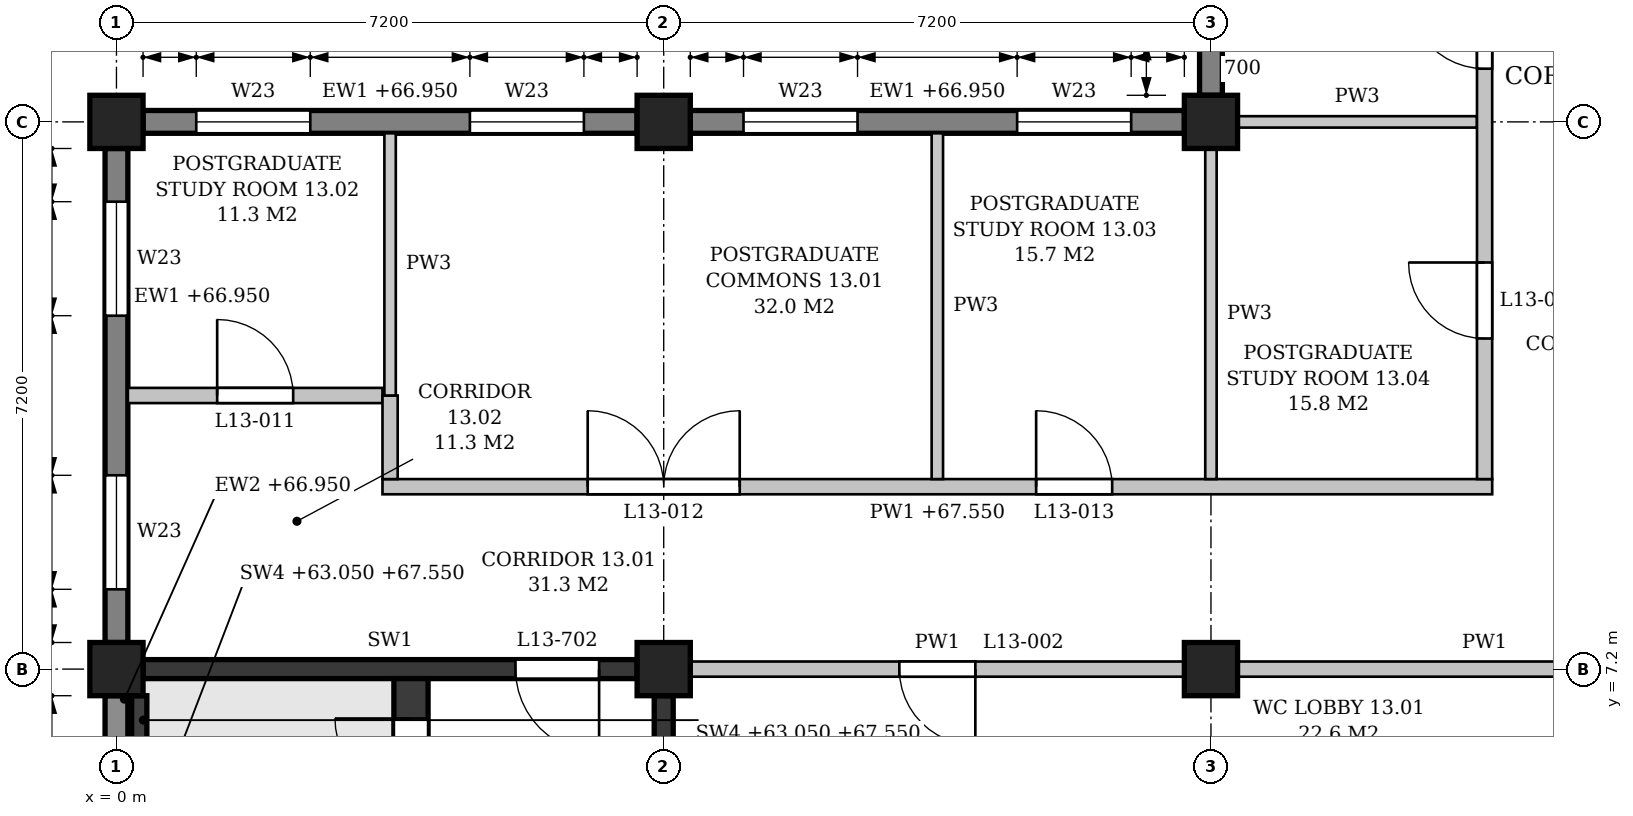
"""IFC4 building model, lengths in metres.
Left out: names, types, materials, properties, quantities, classifications, styles, units other than length and angle.
Written with IfcOpenShell. Run it as: python <this file> out.ifc"""

import sys

from ifc_helpers import new_model, si_unit, direction, frame, frame_2d, origin, origin_2d, place, context, subcontext, project, spatial, polyline, rectangle, outline, extrude, element, fill, save


model = new_model("IFC4")
c1 = context("Model", 3, precision=1e-05, world=origin(), true_north=direction((0.0, 1.0)))
c2 = subcontext(c1, "Body", "Model", "MODEL_VIEW")
j1 = project(units=[si_unit("LENGTHUNIT", "METRE"), si_unit("PLANEANGLEUNIT", "RADIAN")], contexts=[c1])
p1 = place(None, origin())
s1 = spatial("IfcSite", under=j1, at=p1, CompositionType="ELEMENT")
p2 = place(p1, origin())
s2 = spatial("IfcBuilding", under=s1, at=p2, CompositionType="ELEMENT")
p3 = place(p2, frame((0.0, 0.0, 63.3)))
s3 = spatial("IfcBuildingStorey", under=s2, at=p3, CompositionType="ELEMENT", Elevation=63.3)
for number, where, z_axis, x_axis in (
    (1, (0.0, 7.2, 0.0), (0.0, 0.0, 1.0), (1.0, 0.0, 0.0)),
    (2, (0.0, 14.4, 0.0), (0.0, 0.0, 1.0), (1.0, 0.0, 0.0)),
    (3, (7.2, 7.2, 0.0), (0.0, 0.0, 1.0), (1.0, 0.0, 0.0)),
    (4, (7.2, 14.4, 0.0), (0.0, 0.0, 1.0), (1.0, 0.0, 0.0)),
    (5, (14.4, 7.2, 0.0), (0.0, 0.0, 1.0), (1.0, 0.0, 0.0)),
    (6, (14.4, 14.4, 0.0), (0.0, 0.0, 1.0), (1.0, 0.0, 0.0)),
):
    element("IfcColumn", number, at=place(p3, frame(where, z_axis=z_axis, x_axis=x_axis)), inside=s3, PredefinedType="COLUMN", context=c2, shape_type="SweptSolid", body=[
        extrude(rectangle(XDim=0.7, YDim=0.7, at=origin_2d()), origin(), (0.0, 0.0, 1.0), 4.5),
    ])
p4 = place(p3, frame((0.0, 0.35, 0.0), z_axis=(0.0, 0.0, 1.0), x_axis=(0.0, 1.0, 0.0)))
e7 = element("IfcWall", 7, at=p4, inside=s3, PredefinedType="STANDARD", context=c2, shape_type="SweptSolid", body=[
    extrude(rectangle(XDim=6.5, YDim=0.3, at=frame_2d((3.25, 0.0))), origin(), (0.0, 0.0, 1.0), 3.65),
])
p5 = place(p4, frame((1.0, 0.0, 0.9)))
e8 = element("IfcOpeningElement", 8, at=p5, cuts=e7, PredefinedType="OPENING", context=c2, shape_type="SweptSolid", body=[
    extrude(outline(polyline([(0.0, 0.0), (0.9, 0.0), (0.9, 2.25), (0.45, 2.7), (0.0, 2.25), (0.0, 0.0)])), frame((0.0, 0.16, 0.0), z_axis=(0.0, -1.0, 0.0), x_axis=(1.0, 0.0, 0.0)), (0.0, 0.0, 1.0), 0.32),
])
p6 = place(p4, frame((4.6, 0.0, 0.9)))
e9 = element("IfcOpeningElement", 9, at=p6, cuts=e7, PredefinedType="OPENING", context=c2, shape_type="SweptSolid", body=[
    extrude(outline(polyline([(0.0, 0.0), (0.9, 0.0), (0.9, 2.25), (0.45, 2.7), (0.0, 2.25), (0.0, 0.0)])), frame((0.0, 0.16, 0.0), z_axis=(0.0, -1.0, 0.0), x_axis=(1.0, 0.0, 0.0)), (0.0, 0.0, 1.0), 0.32),
])
p7 = place(p3, frame((0.0, 7.55, 0.0), z_axis=(0.0, 0.0, 1.0), x_axis=(0.0, 1.0, 0.0)))
e10 = element("IfcWall", 10, at=p7, inside=s3, PredefinedType="STANDARD", context=c2, shape_type="SweptSolid", body=[
    extrude(rectangle(XDim=6.5, YDim=0.3, at=frame_2d((3.25, 0.0))), origin(), (0.0, 0.0, 1.0), 3.65),
])
p8 = place(p7, frame((0.7, 0.0, 0.9)))
e11 = element("IfcOpeningElement", 11, at=p8, cuts=e10, PredefinedType="OPENING", context=c2, shape_type="SweptSolid", body=[
    extrude(outline(polyline([(0.0, 0.0), (1.5, 0.0), (1.5, 1.95), (0.75, 2.7), (0.0, 1.95), (0.0, 0.0)])), frame((0.0, 0.16, 0.0), z_axis=(0.0, -1.0, 0.0), x_axis=(1.0, 0.0, 0.0)), (0.0, 0.0, 1.0), 0.32),
])
p9 = place(p7, frame((4.3, 0.0, 0.9)))
e12 = element("IfcOpeningElement", 12, at=p9, cuts=e10, PredefinedType="OPENING", context=c2, shape_type="SweptSolid", body=[
    extrude(outline(polyline([(0.0, 0.0), (1.5, 0.0), (1.5, 1.95), (0.75, 2.7), (0.0, 1.95), (0.0, 0.0)])), frame((0.0, 0.16, 0.0), z_axis=(0.0, -1.0, 0.0), x_axis=(1.0, 0.0, 0.0)), (0.0, 0.0, 1.0), 0.32),
])
p10 = place(p3, frame((14.05, 14.4, 0.0), z_axis=(0.0, 0.0, 1.0), x_axis=(-1.0, 0.0, 0.0)))
e13 = element("IfcWall", 13, at=p10, inside=s3, PredefinedType="STANDARD", context=c2, shape_type="SweptSolid", body=[
    extrude(rectangle(XDim=6.5, YDim=0.3, at=frame_2d((3.25, 0.0))), origin(), (0.0, 0.0, 1.0), 3.65),
])
p11 = place(p10, frame((0.7, 0.0, 0.9)))
e14 = element("IfcOpeningElement", 14, at=p11, cuts=e13, PredefinedType="OPENING", context=c2, shape_type="SweptSolid", body=[
    extrude(outline(polyline([(0.0, 0.0), (1.5, 0.0), (1.5, 1.95), (0.75, 2.7), (0.0, 1.95), (0.0, 0.0)])), frame((0.0, 0.16, 0.0), z_axis=(0.0, -1.0, 0.0), x_axis=(1.0, 0.0, 0.0)), (0.0, 0.0, 1.0), 0.32),
])
p12 = place(p10, frame((4.3, 0.0, 0.9)))
e15 = element("IfcOpeningElement", 15, at=p12, cuts=e13, PredefinedType="OPENING", context=c2, shape_type="SweptSolid", body=[
    extrude(outline(polyline([(0.0, 0.0), (1.5, 0.0), (1.5, 1.95), (0.75, 2.7), (0.0, 1.95), (0.0, 0.0)])), frame((0.0, 0.16, 0.0), z_axis=(0.0, -1.0, 0.0), x_axis=(1.0, 0.0, 0.0)), (0.0, 0.0, 1.0), 0.32),
])
p13 = place(p3, frame((6.85, 14.4, 0.0), z_axis=(0.0, 0.0, 1.0), x_axis=(-1.0, 0.0, 0.0)))
e16 = element("IfcWall", 16, at=p13, inside=s3, PredefinedType="STANDARD", context=c2, shape_type="SweptSolid", body=[
    extrude(rectangle(XDim=6.5, YDim=0.3, at=frame_2d((3.25, 0.0))), origin(), (0.0, 0.0, 1.0), 3.65),
])
p14 = place(p13, frame((0.7, 0.0, 0.9)))
e17 = element("IfcOpeningElement", 17, at=p14, cuts=e16, PredefinedType="OPENING", context=c2, shape_type="SweptSolid", body=[
    extrude(outline(polyline([(0.0, 0.0), (1.5, 0.0), (1.5, 1.95), (0.75, 2.7), (0.0, 1.95), (0.0, 0.0)])), frame((0.0, 0.16, 0.0), z_axis=(0.0, -1.0, 0.0), x_axis=(1.0, 0.0, 0.0)), (0.0, 0.0, 1.0), 0.32),
])
p15 = place(p13, frame((4.3, 0.0, 0.9)))
e18 = element("IfcOpeningElement", 18, at=p15, cuts=e16, PredefinedType="OPENING", context=c2, shape_type="SweptSolid", body=[
    extrude(outline(polyline([(0.0, 0.0), (1.5, 0.0), (1.5, 1.95), (0.75, 2.7), (0.0, 1.95), (0.0, 0.0)])), frame((0.0, 0.16, 0.0), z_axis=(0.0, -1.0, 0.0), x_axis=(1.0, 0.0, 0.0)), (0.0, 0.0, 1.0), 0.32),
])
p16 = place(p3, frame((14.4, 14.75, 0.0), z_axis=(0.0, 0.0, 1.0), x_axis=(0.0, 1.0, 0.0)))
e19 = element("IfcWall", 19, at=p16, inside=s3, PredefinedType="STANDARD", context=c2, shape_type="SweptSolid", body=[
    extrude(rectangle(XDim=6.5, YDim=0.3, at=frame_2d((3.25, 0.0))), origin(), (0.0, 0.0, 1.0), 3.65),
])
p17 = place(p16, frame((0.7, 0.0, 0.9)))
e20 = element("IfcOpeningElement", 20, at=p17, cuts=e19, PredefinedType="OPENING", context=c2, shape_type="SweptSolid", body=[
    extrude(outline(polyline([(0.0, 0.0), (1.5, 0.0), (1.5, 1.95), (0.75, 2.7), (0.0, 1.95), (0.0, 0.0)])), frame((0.0, 0.16, 0.0), z_axis=(0.0, -1.0, 0.0), x_axis=(1.0, 0.0, 0.0)), (0.0, 0.0, 1.0), 0.32),
])
p18 = place(p16, frame((4.3, 0.0, 0.9)))
e21 = element("IfcOpeningElement", 21, at=p18, cuts=e19, PredefinedType="OPENING", context=c2, shape_type="SweptSolid", body=[
    extrude(outline(polyline([(0.0, 0.0), (1.5, 0.0), (1.5, 1.95), (0.75, 2.7), (0.0, 1.95), (0.0, 0.0)])), frame((0.0, 0.16, 0.0), z_axis=(0.0, -1.0, 0.0), x_axis=(1.0, 0.0, 0.0)), (0.0, 0.0, 1.0), 0.32),
])
p19 = place(p3, frame((0.35, 7.2, 0.0), z_axis=(0.0, 0.0, 1.0), x_axis=(1.0, 0.0, 0.0)))
e22 = element("IfcWall", 22, at=p19, inside=s3, PredefinedType="SHEAR", context=c2, shape_type="SweptSolid", body=[
    extrude(rectangle(XDim=6.5, YDim=0.25, at=frame_2d((3.25, 0.0))), origin(), (0.0, 0.0, 1.0), 3.6),
])
p20 = place(p19, frame((4.9, 0.0, 0.0)))
e23 = element("IfcOpeningElement", 23, at=p20, cuts=e22, PredefinedType="OPENING", context=c2, shape_type="SweptSolid", body=[
    extrude(rectangle(XDim=1.1, YDim=2.1, at=frame_2d((0.55, 1.05))), frame((0.0, 0.135, 0.0), z_axis=(0.0, -1.0, 0.0), x_axis=(1.0, 0.0, 0.0)), (0.0, 0.0, 1.0), 0.27),
])
p21 = place(p3, frame((7.2, 0.35, 0.0), z_axis=(0.0, 0.0, 1.0), x_axis=(0.0, 1.0, 0.0)))
e24 = element("IfcWall", 24, at=p21, inside=s3, PredefinedType="SHEAR", context=c2, shape_type="SweptSolid", body=[
    extrude(rectangle(XDim=6.5, YDim=0.25, at=frame_2d((3.25, 0.0))), origin(), (0.0, 0.0, 1.0), 3.6),
])
p22 = place(p3, frame((0.3, 5.85, -0.25), z_axis=(0.0, 0.0, 1.0), x_axis=(0.0, 1.0, 0.0)))
e25 = element("IfcWall", 25, at=p22, inside=s3, PredefinedType="SHEAR", context=c2, shape_type="SweptSolid", body=[
    extrude(rectangle(XDim=1.0, YDim=0.2, at=frame_2d((0.5, 0.0))), origin(), (0.0, 0.0, 1.0), 4.5),
])
p23 = place(p3, frame((3.875, 0.15, 0.0), z_axis=(0.0, 0.0, 1.0), x_axis=(0.0, 1.0, 0.0)))
e26 = element("IfcWall", 26, at=p23, inside=s3, PredefinedType="SHEAR", context=c2, shape_type="SweptSolid", body=[
    extrude(rectangle(XDim=6.925, YDim=0.45, at=frame_2d((3.462, 0.0))), origin(), (0.0, 0.0, 1.0), 4.25),
])
p24 = place(p23, frame((5.4, 0.0, 0.0)))
e27 = element("IfcOpeningElement", 27, at=p24, cuts=e26, PredefinedType="OPENING", context=c2, shape_type="SweptSolid", body=[
    extrude(rectangle(XDim=1.0, YDim=2.1, at=frame_2d((0.5, 1.05))), frame((0.0, 0.235, 0.0), z_axis=(0.0, -1.0, 0.0), x_axis=(1.0, 0.0, 0.0)), (0.0, 0.0, 1.0), 0.47),
])
p25 = place(p3, frame((7.55, 7.2, 0.0), z_axis=(0.0, 0.0, 1.0), x_axis=(1.0, 0.0, 0.0)))
e28 = element("IfcWall", 28, at=p25, inside=s3, PredefinedType="PARTITIONING", context=c2, shape_type="SweptSolid", body=[
    extrude(rectangle(XDim=6.5, YDim=0.2, at=frame_2d((3.25, 0.0))), origin(), (0.0, 0.0, 1.0), 3.6),
])
p26 = place(p25, frame((2.75, 0.0, 0.0)))
e29 = element("IfcOpeningElement", 29, at=p26, cuts=e28, PredefinedType="OPENING", context=c2, shape_type="SweptSolid", body=[
    extrude(rectangle(XDim=1.0, YDim=2.1, at=frame_2d((0.5, 1.05))), frame((0.0, 0.11, 0.0), z_axis=(0.0, -1.0, 0.0), x_axis=(1.0, 0.0, 0.0)), (0.0, 0.0, 1.0), 0.22),
])
p27 = place(p3, frame((14.75, 7.2, 0.0), z_axis=(0.0, 0.0, 1.0), x_axis=(1.0, 0.0, 0.0)))
e30 = element("IfcWall", 30, at=p27, inside=s3, PredefinedType="PARTITIONING", context=c2, shape_type="SweptSolid", body=[
    extrude(rectangle(XDim=6.5, YDim=0.2, at=frame_2d((3.25, 0.0))), origin(), (0.0, 0.0, 1.0), 3.6),
])
p28 = place(p27, frame((4.375, 0.0, 0.0)))
e31 = element("IfcOpeningElement", 31, at=p28, cuts=e30, PredefinedType="OPENING", context=c2, shape_type="SweptSolid", body=[
    extrude(rectangle(XDim=1.0, YDim=2.1, at=frame_2d((0.5, 1.05))), frame((0.0, 0.11, 0.0), z_axis=(0.0, -1.0, 0.0), x_axis=(1.0, 0.0, 0.0)), (0.0, 0.0, 1.0), 0.22),
])
p29 = place(p3, frame((3.5, 9.6, 0.0), z_axis=(0.0, 0.0, 1.0), x_axis=(1.0, 0.0, 0.0)))
e32 = element("IfcWall", 32, at=p29, inside=s3, PredefinedType="PARTITIONING", context=c2, shape_type="SweptSolid", body=[
    extrude(outline(polyline([(0.0, 0.0), (14.6, 0.0), (14.6, 4.25), (11.1, 4.25), (11.1, 3.6), (10.7, 3.6), (10.7, 4.25), (3.9, 4.25), (3.9, 3.6), (3.5, 3.6), (3.5, 4.25), (0.0, 4.25), (0.0, 0.0)])), frame((0.0, 0.1, 0.0), z_axis=(0.0, -1.0, 0.0), x_axis=(1.0, 0.0, 0.0)), (0.0, 0.0, 1.0), 0.2),
])
p30 = place(p29, frame((2.7, 0.0, 0.0)))
e33 = element("IfcOpeningElement", 33, at=p30, cuts=e32, PredefinedType="OPENING", context=c2, shape_type="SweptSolid", body=[
    extrude(rectangle(XDim=2.0, YDim=2.1, at=frame_2d((1.0, 1.05))), frame((0.0, 0.11, 0.0), z_axis=(0.0, -1.0, 0.0), x_axis=(1.0, 0.0, 0.0)), (0.0, 0.0, 1.0), 0.22),
])
p31 = place(p29, frame((8.6, 0.0, 0.0)))
e34 = element("IfcOpeningElement", 34, at=p31, cuts=e32, PredefinedType="OPENING", context=c2, shape_type="SweptSolid", body=[
    extrude(rectangle(XDim=1.0, YDim=2.1, at=frame_2d((0.5, 1.05))), frame((0.0, 0.11, 0.0), z_axis=(0.0, -1.0, 0.0), x_axis=(1.0, 0.0, 0.0)), (0.0, 0.0, 1.0), 0.22),
])
p32 = place(p3, frame((0.15, 10.8, 0.0), z_axis=(0.0, 0.0, 1.0), x_axis=(1.0, 0.0, 0.0)))
e35 = element("IfcWall", 35, at=p32, inside=s3, PredefinedType="PARTITIONING", context=c2, shape_type="SweptSolid", body=[
    extrude(outline(polyline([(0.0, 0.0), (3.35, 0.0), (3.35, 4.25), (0.05, 4.25), (0.05, 3.65), (0.0, 3.65), (0.0, 0.0)])), frame((0.0, 0.1, 0.0), z_axis=(0.0, -1.0, 0.0), x_axis=(1.0, 0.0, 0.0)), (0.0, 0.0, 1.0), 0.2),
])
p33 = place(p32, frame((1.175, 0.0, 0.0)))
e36 = element("IfcOpeningElement", 36, at=p33, cuts=e35, PredefinedType="OPENING", context=c2, shape_type="SweptSolid", body=[
    extrude(rectangle(XDim=1.0, YDim=2.1, at=frame_2d((0.5, 1.05))), frame((0.0, 0.11, 0.0), z_axis=(0.0, -1.0, 0.0), x_axis=(1.0, 0.0, 0.0)), (0.0, 0.0, 1.0), 0.22),
])
p34 = place(p3, frame((14.75, 14.4, 0.0), z_axis=(0.0, 0.0, 1.0), x_axis=(1.0, 0.0, 0.0)))
e37 = element("IfcWall", 37, at=p34, inside=s3, PredefinedType="PARTITIONING", context=c2, shape_type="SweptSolid", body=[
    extrude(rectangle(XDim=3.15, YDim=0.15, at=frame_2d((1.575, 0.0))), origin(), (0.0, 0.0, 1.0), 3.6),
])
p35 = place(p3, frame((3.6, 9.7, 0.0), z_axis=(0.0, 0.0, 1.0), x_axis=(0.0, 1.0, 0.0)))
e38 = element("IfcWall", 38, at=p35, inside=s3, PredefinedType="PARTITIONING", context=c2, shape_type="SweptSolid", body=[
    extrude(rectangle(XDim=1.1, YDim=0.2, at=frame_2d((0.55, 0.0))), origin(), (0.0, 0.0, 1.0), 4.25),
])
p36 = place(p3, frame((3.6, 10.8, 0.0), z_axis=(0.0, 0.0, 1.0), x_axis=(0.0, 1.0, 0.0)))
e39 = element("IfcWall", 39, at=p36, inside=s3, PredefinedType="PARTITIONING", context=c2, shape_type="SweptSolid", body=[
    extrude(rectangle(XDim=3.45, YDim=0.15, at=frame_2d((1.725, 0.0))), origin(), (0.0, 0.0, 1.0), 3.6),
])
p37 = place(p3, frame((10.8, 9.7, 0.0), z_axis=(0.0, 0.0, 1.0), x_axis=(0.0, 1.0, 0.0)))
e40 = element("IfcWall", 40, at=p37, inside=s3, PredefinedType="PARTITIONING", context=c2, shape_type="SweptSolid", body=[
    extrude(rectangle(XDim=4.55, YDim=0.15, at=frame_2d((2.275, 0.0))), origin(), (0.0, 0.0, 1.0), 3.6),
])
p38 = place(p3, frame((14.4, 9.7, 0.0), z_axis=(0.0, 0.0, 1.0), x_axis=(0.0, 1.0, 0.0)))
e41 = element("IfcWall", 41, at=p38, inside=s3, PredefinedType="PARTITIONING", context=c2, shape_type="SweptSolid", body=[
    extrude(rectangle(XDim=4.35, YDim=0.15, at=frame_2d((2.175, 0.0))), origin(), (0.0, 0.0, 1.0), 3.6),
])
p39 = place(p3, frame((18.0, 9.7, 0.0), z_axis=(0.0, 0.0, 1.0), x_axis=(0.0, 1.0, 0.0)))
e42 = element("IfcWall", 42, at=p39, inside=s3, PredefinedType="PARTITIONING", context=c2, shape_type="SweptSolid", body=[
    extrude(outline(polyline([(0.0, 0.0), (7.1, 0.0), (7.1, 4.25), (4.9, 4.25), (4.9, 3.65), (4.5, 3.65), (4.5, 4.25), (0.0, 4.25), (0.0, 0.0)])), frame((0.0, 0.1, 0.0), z_axis=(0.0, -1.0, 0.0), x_axis=(1.0, 0.0, 0.0)), (0.0, 0.0, 1.0), 0.2),
])
p40 = place(p39, frame((5.4, 0.0, 0.0)))
e43 = element("IfcOpeningElement", 43, at=p40, cuts=e42, PredefinedType="OPENING", context=c2, shape_type="SweptSolid", body=[
    extrude(rectangle(XDim=1.0, YDim=2.1, at=frame_2d((0.5, 1.05))), frame((0.0, 0.11, 0.0), z_axis=(0.0, -1.0, 0.0), x_axis=(1.0, 0.0, 0.0)), (0.0, 0.0, 1.0), 0.22),
])
p41 = place(p39, frame((1.85, 0.0, 0.0)))
e44 = element("IfcOpeningElement", 44, at=p41, cuts=e42, PredefinedType="OPENING", context=c2, shape_type="SweptSolid", body=[
    extrude(rectangle(XDim=1.0, YDim=2.1, at=frame_2d((0.5, 1.05))), frame((0.0, 0.11, 0.0), z_axis=(0.0, -1.0, 0.0), x_axis=(1.0, 0.0, 0.0)), (0.0, 0.0, 1.0), 0.22),
])
p42 = place(p11, origin())
e45 = element("IfcWindow", 45, at=p42, inside=s3, PartitioningType="SINGLE_PANEL", PredefinedType="WINDOW", context=c2, shape_type="SweptSolid", body=[
    extrude(outline(polyline([(0.0, 0.0), (1.5, 0.0), (1.5, 1.95), (0.75, 2.7), (0.0, 1.95), (0.0, 0.0)])), frame((0.0, 0.03, 0.0), z_axis=(0.0, -1.0, 0.0), x_axis=(1.0, 0.0, 0.0)), (0.0, 0.0, 1.0), 0.06),
])
fill(e14, e45)
p43 = place(p12, origin())
e46 = element("IfcWindow", 46, at=p43, inside=s3, PartitioningType="SINGLE_PANEL", PredefinedType="WINDOW", context=c2, shape_type="SweptSolid", body=[
    extrude(outline(polyline([(0.0, 0.0), (1.5, 0.0), (1.5, 1.95), (0.75, 2.7), (0.0, 1.95), (0.0, 0.0)])), frame((0.0, 0.03, 0.0), z_axis=(0.0, -1.0, 0.0), x_axis=(1.0, 0.0, 0.0)), (0.0, 0.0, 1.0), 0.06),
])
fill(e15, e46)
p44 = place(p14, origin())
e47 = element("IfcWindow", 47, at=p44, inside=s3, PartitioningType="SINGLE_PANEL", PredefinedType="WINDOW", context=c2, shape_type="SweptSolid", body=[
    extrude(outline(polyline([(0.0, 0.0), (1.5, 0.0), (1.5, 1.95), (0.75, 2.7), (0.0, 1.95), (0.0, 0.0)])), frame((0.0, 0.03, 0.0), z_axis=(0.0, -1.0, 0.0), x_axis=(1.0, 0.0, 0.0)), (0.0, 0.0, 1.0), 0.06),
])
fill(e17, e47)
p45 = place(p15, origin())
e48 = element("IfcWindow", 48, at=p45, inside=s3, PartitioningType="SINGLE_PANEL", PredefinedType="WINDOW", context=c2, shape_type="SweptSolid", body=[
    extrude(outline(polyline([(0.0, 0.0), (1.5, 0.0), (1.5, 1.95), (0.75, 2.7), (0.0, 1.95), (0.0, 0.0)])), frame((0.0, 0.03, 0.0), z_axis=(0.0, -1.0, 0.0), x_axis=(1.0, 0.0, 0.0)), (0.0, 0.0, 1.0), 0.06),
])
fill(e18, e48)
p46 = place(p8, origin())
e49 = element("IfcWindow", 49, at=p46, inside=s3, PartitioningType="SINGLE_PANEL", PredefinedType="WINDOW", context=c2, shape_type="SweptSolid", body=[
    extrude(outline(polyline([(0.0, 0.0), (1.5, 0.0), (1.5, 1.95), (0.75, 2.7), (0.0, 1.95), (0.0, 0.0)])), frame((0.0, 0.03, 0.0), z_axis=(0.0, -1.0, 0.0), x_axis=(1.0, 0.0, 0.0)), (0.0, 0.0, 1.0), 0.06),
])
fill(e11, e49)
p47 = place(p9, origin())
e50 = element("IfcWindow", 50, at=p47, inside=s3, PartitioningType="SINGLE_PANEL", PredefinedType="WINDOW", context=c2, shape_type="SweptSolid", body=[
    extrude(outline(polyline([(0.0, 0.0), (1.5, 0.0), (1.5, 1.95), (0.75, 2.7), (0.0, 1.95), (0.0, 0.0)])), frame((0.0, 0.03, 0.0), z_axis=(0.0, -1.0, 0.0), x_axis=(1.0, 0.0, 0.0)), (0.0, 0.0, 1.0), 0.06),
])
fill(e12, e50)
p48 = place(p24, origin())
e51 = element("IfcDoor", 51, at=p48, inside=s3, OperationType="SINGLE_SWING_RIGHT", PredefinedType="DOOR", context=c2, shape_type="SweptSolid", body=[
    extrude(rectangle(XDim=1.0, YDim=2.1, at=frame_2d((0.5, 1.05))), frame((0.0, 0.025, 0.0), z_axis=(0.0, -1.0, 0.0), x_axis=(1.0, 0.0, 0.0)), (0.0, 0.0, 1.0), 0.05),
])
fill(e27, e51)
p49 = place(p20, frame((1.1, 0.0, 0.0), z_axis=(0.0, 0.0, 1.0), x_axis=(-1.0, 0.0, 0.0)))
e52 = element("IfcDoor", 52, at=p49, inside=s3, OperationType="SINGLE_SWING_LEFT", PredefinedType="DOOR", context=c2, shape_type="SweptSolid", body=[
    extrude(rectangle(XDim=1.1, YDim=2.1, at=frame_2d((0.55, 1.05))), frame((0.0, 0.025, 0.0), z_axis=(0.0, -1.0, 0.0), x_axis=(1.0, 0.0, 0.0)), (0.0, 0.0, 1.0), 0.05),
])
fill(e23, e52)
p50 = place(p26, frame((1.0, 0.0, 0.0), z_axis=(0.0, 0.0, 1.0), x_axis=(-1.0, 0.0, 0.0)))
e53 = element("IfcDoor", 53, at=p50, inside=s3, OperationType="SINGLE_SWING_LEFT", PredefinedType="DOOR", context=c2, shape_type="SweptSolid", body=[
    extrude(rectangle(XDim=1.0, YDim=2.1, at=frame_2d((0.5, 1.05))), frame((0.0, 0.025, 0.0), z_axis=(0.0, -1.0, 0.0), x_axis=(1.0, 0.0, 0.0)), (0.0, 0.0, 1.0), 0.05),
])
fill(e29, e53)
p51 = place(p40, origin())
e54 = element("IfcDoor", 54, at=p51, inside=s3, OperationType="SINGLE_SWING_RIGHT", PredefinedType="DOOR", context=c2, shape_type="SweptSolid", body=[
    extrude(rectangle(XDim=1.0, YDim=2.1, at=frame_2d((0.5, 1.05))), frame((0.0, 0.025, 0.0), z_axis=(0.0, -1.0, 0.0), x_axis=(1.0, 0.0, 0.0)), (0.0, 0.0, 1.0), 0.05),
])
fill(e43, e54)
p52 = place(p33, origin())
e55 = element("IfcDoor", 55, at=p52, inside=s3, OperationType="SINGLE_SWING_LEFT", PredefinedType="DOOR", context=c2, shape_type="SweptSolid", body=[
    extrude(rectangle(XDim=1.0, YDim=2.1, at=frame_2d((0.5, 1.05))), frame((0.0, 0.025, 0.0), z_axis=(0.0, -1.0, 0.0), x_axis=(1.0, 0.0, 0.0)), (0.0, 0.0, 1.0), 0.05),
])
fill(e36, e55)
p53 = place(p30, origin())
e56 = element("IfcDoor", 56, at=p53, inside=s3, OperationType="DOUBLE_DOOR_SINGLE_SWING", PredefinedType="DOOR", context=c2, shape_type="SweptSolid", body=[
    extrude(rectangle(XDim=2.0, YDim=2.1, at=frame_2d((1.0, 1.05))), frame((0.0, 0.025, 0.0), z_axis=(0.0, -1.0, 0.0), x_axis=(1.0, 0.0, 0.0)), (0.0, 0.0, 1.0), 0.05),
])
fill(e33, e56)
p54 = place(p31, origin())
e57 = element("IfcDoor", 57, at=p54, inside=s3, OperationType="SINGLE_SWING_LEFT", PredefinedType="DOOR", context=c2, shape_type="SweptSolid", body=[
    extrude(rectangle(XDim=1.0, YDim=2.1, at=frame_2d((0.5, 1.05))), frame((0.0, 0.025, 0.0), z_axis=(0.0, -1.0, 0.0), x_axis=(1.0, 0.0, 0.0)), (0.0, 0.0, 1.0), 0.05),
])
fill(e34, e57)
p55 = place(p41, origin())
e58 = element("IfcDoor", 58, at=p55, inside=s3, OperationType="SINGLE_SWING_RIGHT", PredefinedType="DOOR", context=c2, shape_type="SweptSolid", body=[
    extrude(rectangle(XDim=1.0, YDim=2.1, at=frame_2d((0.5, 1.05))), frame((0.0, 0.025, 0.0), z_axis=(0.0, -1.0, 0.0), x_axis=(1.0, 0.0, 0.0)), (0.0, 0.0, 1.0), 0.05),
])
fill(e44, e58)
save(model, sys.argv[1])
